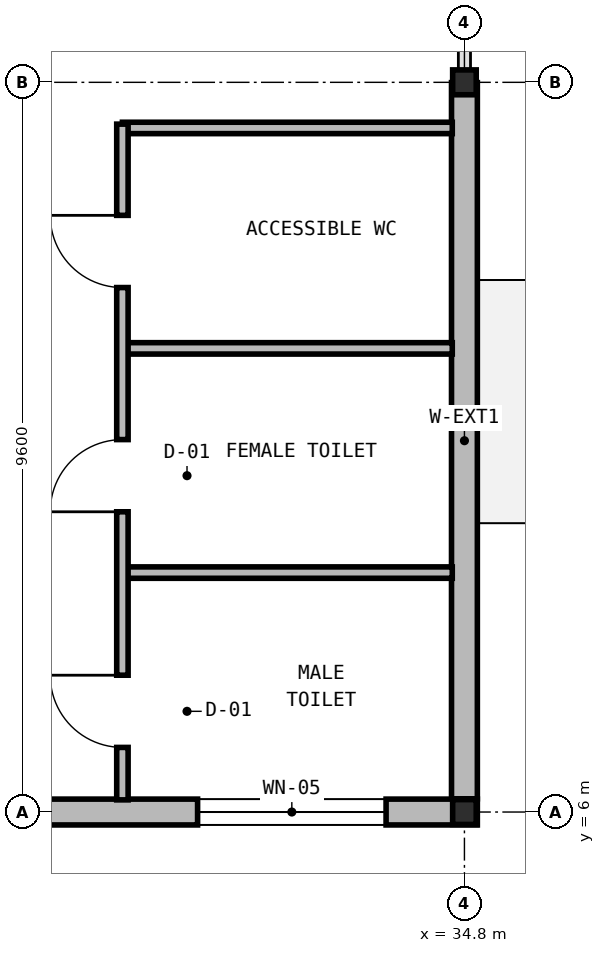
"""IFC4 building model, lengths in metres.
Left out: names, types, materials, properties, quantities, classifications, styles, units other than length and angle.
Written with IfcOpenShell. Run it as: python <this file> out.ifc"""

import sys

from ifc_helpers import new_model, si_unit, direction, frame, frame_2d, origin, origin_2d, place, context, subcontext, project, spatial, rectangle, i_section, extrude, element, fill, save


model = new_model("IFC4")
c1 = context("Model", 3, precision=1e-05, world=origin(), true_north=direction((0.0, 1.0)))
c2 = subcontext(c1, "Body", "Model", "MODEL_VIEW")
j1 = project(units=[si_unit("LENGTHUNIT", "METRE"), si_unit("PLANEANGLEUNIT", "RADIAN")], contexts=[c1])
p1 = place(None, origin())
s1 = spatial("IfcSite", under=j1, at=p1, CompositionType="ELEMENT")
p2 = place(p1, origin())
s2 = spatial("IfcBuilding", under=s1, at=p2, CompositionType="ELEMENT")
p3 = place(p2, origin())
s3 = spatial("IfcBuildingStorey", under=s2, at=p3, CompositionType="ELEMENT", Elevation=0.0)
for number, where, z_axis, x_axis in (
    (1, (34.8, 6.0, 0.0), (0.0, 0.0, 1.0), (1.0, 0.0, 0.0)),
    (2, (34.8, 15.6, 0.0), (0.0, 0.0, 1.0), (1.0, 0.0, 0.0)),
):
    element("IfcColumn", number, at=place(p3, frame(where, z_axis=z_axis, x_axis=x_axis)), inside=s3, PredefinedType="COLUMN", context=c2, shape_type="SweptSolid", body=[
        extrude(i_section(OverallWidth=0.31, OverallDepth=0.327, WebThickness=0.016, FlangeThickness=0.025, at=origin_2d()), origin(), (0.0, 0.0, 1.0), 5.25),
    ])
p4 = place(p3, frame((34.8, 15.596, 0.0), z_axis=(0.0, 0.0, 1.0), x_axis=(0.0, -1.0, 0.0)))
e3 = element("IfcWall", 3, at=p4, inside=s3, PredefinedType="SOLIDWALL", context=c2, shape_type="SweptSolid", body=[
    extrude(rectangle(XDim=9.422, YDim=0.34, at=frame_2d((4.711, 0.0))), origin(), (0.0, 0.0, 1.0), 4.584),
])
p5 = place(p3, frame((34.97, 6.0, 0.0), z_axis=(0.0, 0.0, 1.0), x_axis=(-1.0, 0.0, 0.0)))
e4 = element("IfcWall", 4, at=p5, inside=s3, PredefinedType="SOLIDWALL", context=c2, shape_type="SweptSolid", body=[
    extrude(rectangle(XDim=9.766, YDim=0.34, at=frame_2d((4.883, 0.0))), origin(), (0.0, 0.0, 1.0), 4.584),
])
p6 = place(p5, frame((1.201, 0.0, 0.95)))
e5 = element("IfcOpeningElement", 5, at=p6, cuts=e4, PredefinedType="OPENING", context=c2, shape_type="SweptSolid", body=[
    extrude(rectangle(XDim=2.48, YDim=1.86, at=frame_2d((1.24, 0.93))), frame((0.0, 0.18, 0.0), z_axis=(0.0, -1.0, 0.0), x_axis=(1.0, 0.0, 0.0)), (0.0, 0.0, 1.0), 0.36),
])
for number, where, z_axis, x_axis in (
    (6, (30.3, 9.15, 0.0), (0.0, 0.0, 1.0), (1.0, 0.0, 0.0)),
    (7, (30.3, 12.1, 0.0), (0.0, 0.0, 1.0), (1.0, 0.0, 0.0)),
    (8, (30.3, 15.0, 0.0), (0.0, 0.0, 1.0), (1.0, 0.0, 0.0)),
):
    element("IfcWall", number, at=place(p3, frame(where, z_axis=z_axis, x_axis=x_axis)), inside=s3, PredefinedType="PARTITIONING", context=c2, shape_type="SweptSolid", body=[
        extrude(rectangle(XDim=4.34, YDim=0.15, at=frame_2d((2.17, 0.0))), origin(), (0.0, 0.0, 1.0), 4.93),
    ])
p7 = place(p3, frame((30.3, 6.16, 0.0), z_axis=(0.0, 0.0, 1.0), x_axis=(0.0, 1.0, 0.0)))
e9 = element("IfcWall", 9, at=p7, inside=s3, PredefinedType="PARTITIONING", context=c2, shape_type="SweptSolid", body=[
    extrude(rectangle(XDim=8.89, YDim=0.15, at=frame_2d((4.445, 0.0))), origin(), (0.0, 0.0, 1.0), 4.93),
])
p8 = place(p7, frame((0.69, 0.0, 0.0)))
e10 = element("IfcOpeningElement", 10, at=p8, cuts=e9, PredefinedType="OPENING", context=c2, shape_type="SweptSolid", body=[
    extrude(rectangle(XDim=0.95, YDim=2.1, at=frame_2d((0.475, 1.05))), frame((0.0, 0.085, 0.0), z_axis=(0.0, -1.0, 0.0), x_axis=(1.0, 0.0, 0.0)), (0.0, 0.0, 1.0), 0.17),
])
p9 = place(p7, frame((3.79, 0.0, 0.0)))
e11 = element("IfcOpeningElement", 11, at=p9, cuts=e9, PredefinedType="OPENING", context=c2, shape_type="SweptSolid", body=[
    extrude(rectangle(XDim=0.95, YDim=2.1, at=frame_2d((0.475, 1.05))), frame((0.0, 0.085, 0.0), z_axis=(0.0, -1.0, 0.0), x_axis=(1.0, 0.0, 0.0)), (0.0, 0.0, 1.0), 0.17),
])
p10 = place(p7, frame((6.74, 0.0, 0.0)))
e12 = element("IfcOpeningElement", 12, at=p10, cuts=e9, PredefinedType="OPENING", context=c2, shape_type="SweptSolid", body=[
    extrude(rectangle(XDim=0.95, YDim=2.1, at=frame_2d((0.475, 1.05))), frame((0.0, 0.085, 0.0), z_axis=(0.0, -1.0, 0.0), x_axis=(1.0, 0.0, 0.0)), (0.0, 0.0, 1.0), 0.17),
])
p11 = place(p6, origin())
e13 = element("IfcWindow", 13, at=p11, inside=s3, PartitioningType="SINGLE_PANEL", PredefinedType="WINDOW", context=c2, shape_type="SweptSolid", body=[
    extrude(rectangle(XDim=2.48, YDim=1.86, at=frame_2d((1.24, 0.93))), frame((0.0, 0.03, 0.0), z_axis=(0.0, -1.0, 0.0), x_axis=(1.0, 0.0, 0.0)), (0.0, 0.0, 1.0), 0.06),
])
fill(e5, e13)
p12 = place(p8, origin())
e14 = element("IfcDoor", 14, at=p12, inside=s3, OperationType="SINGLE_SWING_RIGHT", PredefinedType="DOOR", context=c2, shape_type="SweptSolid", body=[
    extrude(rectangle(XDim=0.95, YDim=2.1, at=frame_2d((0.475, 1.05))), frame((0.0, 0.025, 0.0), z_axis=(0.0, -1.0, 0.0), x_axis=(1.0, 0.0, 0.0)), (0.0, 0.0, 1.0), 0.05),
])
fill(e10, e14)
p13 = place(p9, origin())
e15 = element("IfcDoor", 15, at=p13, inside=s3, OperationType="SINGLE_SWING_LEFT", PredefinedType="DOOR", context=c2, shape_type="SweptSolid", body=[
    extrude(rectangle(XDim=0.95, YDim=2.1, at=frame_2d((0.475, 1.05))), frame((0.0, 0.025, 0.0), z_axis=(0.0, -1.0, 0.0), x_axis=(1.0, 0.0, 0.0)), (0.0, 0.0, 1.0), 0.05),
])
fill(e11, e15)
p14 = place(p10, origin())
e16 = element("IfcDoor", 16, at=p14, inside=s3, OperationType="SINGLE_SWING_RIGHT", PredefinedType="DOOR", context=c2, shape_type="SweptSolid", body=[
    extrude(rectangle(XDim=0.95, YDim=2.1, at=frame_2d((0.475, 1.05))), frame((0.0, 0.025, 0.0), z_axis=(0.0, -1.0, 0.0), x_axis=(1.0, 0.0, 0.0)), (0.0, 0.0, 1.0), 0.05),
])
fill(e12, e16)
save(model, sys.argv[1])
